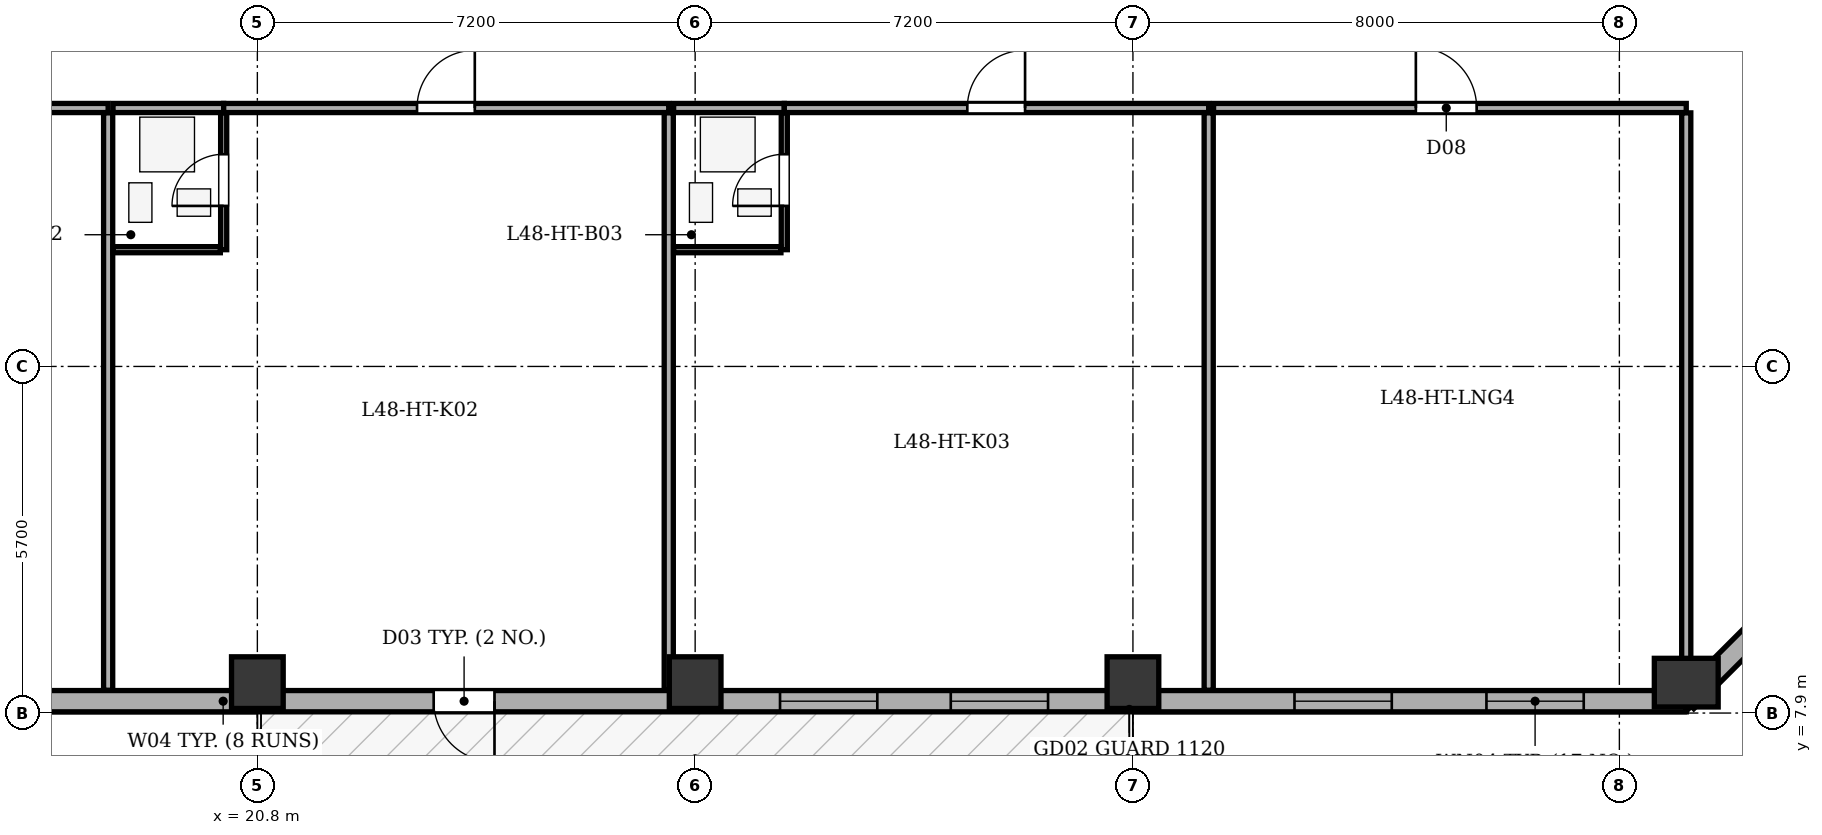
"""IFC4 building model, lengths in metres.
Left out: names, types, materials, properties, quantities, classifications, styles, units other than length and angle.
Written with IfcOpenShell. Run it as: python <this file> out.ifc"""

import sys

from ifc_helpers import new_model, si_unit, direction, frame, frame_2d, origin, origin_2d, place, context, subcontext, project, spatial, rectangle, extrude, element, fill, save


model = new_model("IFC4")
c1 = context("Model", 3, precision=1e-05, world=origin(), true_north=direction((0.0, 1.0)))
c2 = subcontext(c1, "Body", "Model", "MODEL_VIEW")
j1 = project(units=[si_unit("LENGTHUNIT", "METRE"), si_unit("PLANEANGLEUNIT", "RADIAN")], contexts=[c1])
p1 = place(None, origin())
s1 = spatial("IfcSite", under=j1, at=p1, CompositionType="ELEMENT")
p2 = place(p1, origin())
s2 = spatial("IfcBuilding", under=s1, at=p2, CompositionType="ELEMENT")
p3 = place(p2, frame((0.0, 0.0, 186.8)))
s3 = spatial("IfcBuildingStorey", under=s2, at=p3, CompositionType="ELEMENT", Elevation=186.8)
for number, where, z_axis, x_axis in (
    (1, (20.8, 8.4, 0.0), (0.0, 0.0, 1.0), (1.0, 0.0, 0.0)),
    (2, (28.0, 8.4, 0.0), (0.0, 0.0, 1.0), (1.0, 0.0, 0.0)),
    (3, (35.2, 8.4, 0.0), (0.0, 0.0, 1.0), (1.0, 0.0, 0.0)),
):
    element("IfcColumn", number, at=place(p3, frame(where, z_axis=z_axis, x_axis=x_axis)), inside=s3, PredefinedType="COLUMN", context=c2, shape_type="SweptSolid", body=[
        extrude(rectangle(XDim=0.85, YDim=0.85, at=origin_2d()), origin(), (0.0, 0.0, 1.0), 3.5),
    ])
p4 = place(p3, frame((44.3, 8.4, 0.0), z_axis=(0.0, 0.0, 1.0), x_axis=(1.0, 0.0, 0.0)))
e4 = element("IfcColumn", 4, at=p4, inside=s3, PredefinedType="COLUMN", context=c2, shape_type="SweptSolid", body=[
    extrude(rectangle(XDim=0.8, YDim=1.05, at=origin_2d()), origin(), (0.0, 0.0, 1.0), 3.5),
])
p5 = place(p3, frame((44.3, 8.095, 0.0), z_axis=(0.0, 0.0, 1.0), x_axis=(-1.0, 0.0, 0.0)))
e5 = element("IfcWall", 5, at=p5, inside=s3, PredefinedType="STANDARD", context=c2, shape_type="SweptSolid", body=[
    extrude(rectangle(XDim=35.0, YDim=0.35, at=frame_2d((17.5, 0.0))), origin(), (0.0, 0.0, 1.0), 2.785),
])
p6 = place(p5, frame((19.6, 0.0, 0.0)))
e6 = element("IfcOpeningElement", 6, at=p6, cuts=e5, PredefinedType="OPENING", context=c2, shape_type="SweptSolid", body=[
    extrude(rectangle(XDim=1.0, YDim=2.02, at=frame_2d((0.5, 1.01))), frame((0.0, 0.185, 0.0), z_axis=(0.0, -1.0, 0.0), x_axis=(1.0, 0.0, 0.0)), (0.0, 0.0, 1.0), 0.37),
])
p7 = place(p5, frame((1.686, 0.0, 0.75)))
e7 = element("IfcOpeningElement", 7, at=p7, cuts=e5, PredefinedType="OPENING", context=c2, shape_type="SweptSolid", body=[
    extrude(rectangle(XDim=1.6, YDim=1.75, at=frame_2d((0.8, 0.875))), frame((0.0, 0.185, 0.0), z_axis=(0.0, -1.0, 0.0), x_axis=(1.0, 0.0, 0.0)), (0.0, 0.0, 1.0), 0.37),
])
p8 = place(p5, frame((4.843, 0.0, 0.75)))
e8 = element("IfcOpeningElement", 8, at=p8, cuts=e5, PredefinedType="OPENING", context=c2, shape_type="SweptSolid", body=[
    extrude(rectangle(XDim=1.6, YDim=1.75, at=frame_2d((0.8, 0.875))), frame((0.0, 0.185, 0.0), z_axis=(0.0, -1.0, 0.0), x_axis=(1.0, 0.0, 0.0)), (0.0, 0.0, 1.0), 0.37),
])
p9 = place(p5, frame((10.496, 0.0, 0.75)))
e9 = element("IfcOpeningElement", 9, at=p9, cuts=e5, PredefinedType="OPENING", context=c2, shape_type="SweptSolid", body=[
    extrude(rectangle(XDim=1.6, YDim=1.75, at=frame_2d((0.8, 0.875))), frame((0.0, 0.185, 0.0), z_axis=(0.0, -1.0, 0.0), x_axis=(1.0, 0.0, 0.0)), (0.0, 0.0, 1.0), 0.37),
])
p10 = place(p5, frame((13.304, 0.0, 0.75)))
e10 = element("IfcOpeningElement", 10, at=p10, cuts=e5, PredefinedType="OPENING", context=c2, shape_type="SweptSolid", body=[
    extrude(rectangle(XDim=1.6, YDim=1.75, at=frame_2d((0.8, 0.875))), frame((0.0, 0.185, 0.0), z_axis=(0.0, -1.0, 0.0), x_axis=(1.0, 0.0, 0.0)), (0.0, 0.0, 1.0), 0.37),
])
p11 = place(p5, frame((27.525, 0.0, 0.75)))
e11 = element("IfcOpeningElement", 11, at=p11, cuts=e5, PredefinedType="OPENING", context=c2, shape_type="SweptSolid", body=[
    extrude(rectangle(XDim=1.6, YDim=1.75, at=frame_2d((0.8, 0.875))), frame((0.0, 0.185, 0.0), z_axis=(0.0, -1.0, 0.0), x_axis=(1.0, 0.0, 0.0)), (0.0, 0.0, 1.0), 0.37),
])
p12 = place(p5, frame((30.729, 0.0, 0.75)))
e12 = element("IfcOpeningElement", 12, at=p12, cuts=e5, PredefinedType="OPENING", context=c2, shape_type="SweptSolid", body=[
    extrude(rectangle(XDim=2.1, YDim=1.75, at=frame_2d((1.05, 0.875))), frame((0.0, 0.185, 0.0), z_axis=(0.0, -1.0, 0.0), x_axis=(1.0, 0.0, 0.0)), (0.0, 0.0, 1.0), 0.37),
])
p13 = place(p3, frame((49.105, 12.9, 0.0), z_axis=(0.0, 0.0, 1.0), x_axis=(-0.707106781187, -0.707106781187, 0.0)))
e13 = element("IfcWall", 13, at=p13, inside=s3, PredefinedType="STANDARD", context=c2, shape_type="SweptSolid", body=[
    extrude(rectangle(XDim=6.795, YDim=0.35, at=frame_2d((3.397, 0.0))), origin(), (0.0, 0.0, 1.0), 2.785),
])
p14 = place(p13, frame((2.698, 0.0, 0.75)))
e14 = element("IfcOpeningElement", 14, at=p14, cuts=e13, PredefinedType="OPENING", context=c2, shape_type="SweptSolid", body=[
    extrude(rectangle(XDim=1.4, YDim=1.65, at=frame_2d((0.7, 0.825))), frame((0.0, 0.185, 0.0), z_axis=(0.0, -1.0, 0.0), x_axis=(1.0, 0.0, 0.0)), (0.0, 0.0, 1.0), 0.37),
])
p15 = place(p3, frame((12.05, 17.85, 0.0), z_axis=(0.0, 0.0, 1.0), x_axis=(1.0, 0.0, 0.0)))
e15 = element("IfcWall", 15, at=p15, inside=s3, PredefinedType="PARTITIONING", context=c2, shape_type="SweptSolid", body=[
    extrude(rectangle(XDim=6.296, YDim=0.15, at=frame_2d((3.148, 0.0))), origin(), (0.0, 0.0, 1.0), 3.2),
])
p16 = place(p15, frame((2.668, 0.0, 0.0)))
e16 = element("IfcOpeningElement", 16, at=p16, cuts=e15, PredefinedType="OPENING", context=c2, shape_type="SweptSolid", body=[
    extrude(rectangle(XDim=0.95, YDim=2.1, at=frame_2d((0.475, 1.05))), frame((0.0, 0.085, 0.0), z_axis=(0.0, -1.0, 0.0), x_axis=(1.0, 0.0, 0.0)), (0.0, 0.0, 1.0), 0.17),
])
p17 = place(p3, frame((18.346, 8.275, 0.0), z_axis=(0.0, 0.0, 1.0), x_axis=(0.0, 1.0, 0.0)))
e17 = element("IfcWall", 17, at=p17, inside=s3, PredefinedType="PARTITIONING", context=c2, shape_type="SweptSolid", body=[
    extrude(rectangle(XDim=9.495, YDim=0.15, at=frame_2d((4.748, 0.0))), origin(), (0.0, 0.0, 1.0), 3.2),
])
p18 = place(p3, frame((18.426, 17.85, 0.0), z_axis=(0.0, 0.0, 1.0), x_axis=(1.0, 0.0, 0.0)))
e18 = element("IfcWall", 18, at=p18, inside=s3, PredefinedType="PARTITIONING", context=c2, shape_type="SweptSolid", body=[
    extrude(rectangle(XDim=1.82, YDim=0.15, at=frame_2d((0.91, 0.0))), origin(), (0.0, 0.0, 1.0), 3.2),
])
p19 = place(p3, frame((20.246, 17.85, 0.0), z_axis=(0.0, 0.0, 1.0), x_axis=(1.0, 0.0, 0.0)))
e19 = element("IfcWall", 19, at=p19, inside=s3, PredefinedType="PARTITIONING", context=c2, shape_type="SweptSolid", body=[
    extrude(rectangle(XDim=7.32, YDim=0.15, at=frame_2d((3.66, 0.0))), origin(), (0.0, 0.0, 1.0), 3.2),
])
p20 = place(p19, frame((3.18, 0.0, 0.0)))
e20 = element("IfcOpeningElement", 20, at=p20, cuts=e19, PredefinedType="OPENING", context=c2, shape_type="SweptSolid", body=[
    extrude(rectangle(XDim=0.95, YDim=2.1, at=frame_2d((0.475, 1.05))), frame((0.0, 0.085, 0.0), z_axis=(0.0, -1.0, 0.0), x_axis=(1.0, 0.0, 0.0)), (0.0, 0.0, 1.0), 0.17),
])
p21 = place(p3, frame((20.246, 15.52, 0.0), z_axis=(0.0, 0.0, 1.0), x_axis=(0.0, 1.0, 0.0)))
e21 = element("IfcWall", 21, at=p21, inside=s3, PredefinedType="PARTITIONING", context=c2, shape_type="SweptSolid", body=[
    extrude(rectangle(XDim=2.25, YDim=0.1, at=frame_2d((1.125, 0.0))), origin(), (0.0, 0.0, 1.0), 3.2),
])
p22 = place(p21, frame((0.72, 0.0, 0.0)))
e22 = element("IfcOpeningElement", 22, at=p22, cuts=e21, PredefinedType="OPENING", context=c2, shape_type="SweptSolid", body=[
    extrude(rectangle(XDim=0.85, YDim=2.05, at=frame_2d((0.425, 1.025))), frame((0.0, 0.06, 0.0), z_axis=(0.0, -1.0, 0.0), x_axis=(1.0, 0.0, 0.0)), (0.0, 0.0, 1.0), 0.12),
])
p23 = place(p3, frame((18.426, 15.52, 0.0), z_axis=(0.0, 0.0, 1.0), x_axis=(1.0, 0.0, 0.0)))
e23 = element("IfcWall", 23, at=p23, inside=s3, PredefinedType="PARTITIONING", context=c2, shape_type="SweptSolid", body=[
    extrude(rectangle(XDim=1.765, YDim=0.1, at=frame_2d((0.882, 0.0))), origin(), (0.0, 0.0, 1.0), 3.2),
])
p24 = place(p3, frame((27.566, 8.275, 0.0), z_axis=(0.0, 0.0, 1.0), x_axis=(0.0, 1.0, 0.0)))
e24 = element("IfcWall", 24, at=p24, inside=s3, PredefinedType="PARTITIONING", context=c2, shape_type="SweptSolid", body=[
    extrude(rectangle(XDim=9.495, YDim=0.15, at=frame_2d((4.748, 0.0))), origin(), (0.0, 0.0, 1.0), 3.2),
])
p25 = place(p3, frame((27.646, 17.85, 0.0), z_axis=(0.0, 0.0, 1.0), x_axis=(1.0, 0.0, 0.0)))
e25 = element("IfcWall", 25, at=p25, inside=s3, PredefinedType="PARTITIONING", context=c2, shape_type="SweptSolid", body=[
    extrude(rectangle(XDim=1.82, YDim=0.15, at=frame_2d((0.91, 0.0))), origin(), (0.0, 0.0, 1.0), 3.2),
])
p26 = place(p3, frame((29.466, 17.85, 0.0), z_axis=(0.0, 0.0, 1.0), x_axis=(1.0, 0.0, 0.0)))
e26 = element("IfcWall", 26, at=p26, inside=s3, PredefinedType="PARTITIONING", context=c2, shape_type="SweptSolid", body=[
    extrude(rectangle(XDim=6.98, YDim=0.15, at=frame_2d((3.49, 0.0))), origin(), (0.0, 0.0, 1.0), 3.2),
])
p27 = place(p26, frame((3.01, 0.0, 0.0)))
e27 = element("IfcOpeningElement", 27, at=p27, cuts=e26, PredefinedType="OPENING", context=c2, shape_type="SweptSolid", body=[
    extrude(rectangle(XDim=0.95, YDim=2.1, at=frame_2d((0.475, 1.05))), frame((0.0, 0.085, 0.0), z_axis=(0.0, -1.0, 0.0), x_axis=(1.0, 0.0, 0.0)), (0.0, 0.0, 1.0), 0.17),
])
p28 = place(p3, frame((29.466, 15.52, 0.0), z_axis=(0.0, 0.0, 1.0), x_axis=(0.0, 1.0, 0.0)))
e28 = element("IfcWall", 28, at=p28, inside=s3, PredefinedType="PARTITIONING", context=c2, shape_type="SweptSolid", body=[
    extrude(rectangle(XDim=2.25, YDim=0.1, at=frame_2d((1.125, 0.0))), origin(), (0.0, 0.0, 1.0), 3.2),
])
p29 = place(p28, frame((0.72, 0.0, 0.0)))
e29 = element("IfcOpeningElement", 29, at=p29, cuts=e28, PredefinedType="OPENING", context=c2, shape_type="SweptSolid", body=[
    extrude(rectangle(XDim=0.85, YDim=2.05, at=frame_2d((0.425, 1.025))), frame((0.0, 0.06, 0.0), z_axis=(0.0, -1.0, 0.0), x_axis=(1.0, 0.0, 0.0)), (0.0, 0.0, 1.0), 0.12),
])
p30 = place(p3, frame((27.646, 15.52, 0.0), z_axis=(0.0, 0.0, 1.0), x_axis=(1.0, 0.0, 0.0)))
e30 = element("IfcWall", 30, at=p30, inside=s3, PredefinedType="PARTITIONING", context=c2, shape_type="SweptSolid", body=[
    extrude(rectangle(XDim=1.765, YDim=0.1, at=frame_2d((0.882, 0.0))), origin(), (0.0, 0.0, 1.0), 3.2),
])
p31 = place(p3, frame((36.446, 8.275, 0.0), z_axis=(0.0, 0.0, 1.0), x_axis=(0.0, 1.0, 0.0)))
e31 = element("IfcWall", 31, at=p31, inside=s3, PredefinedType="PARTITIONING", context=c2, shape_type="SweptSolid", body=[
    extrude(rectangle(XDim=9.495, YDim=0.15, at=frame_2d((4.748, 0.0))), origin(), (0.0, 0.0, 1.0), 3.2),
])
p32 = place(p3, frame((36.526, 17.85, 0.0), z_axis=(0.0, 0.0, 1.0), x_axis=(1.0, 0.0, 0.0)))
e32 = element("IfcWall", 32, at=p32, inside=s3, PredefinedType="PARTITIONING", context=c2, shape_type="SweptSolid", body=[
    extrude(rectangle(XDim=7.774, YDim=0.15, at=frame_2d((3.887, 0.0))), origin(), (0.0, 0.0, 1.0), 3.2),
])
p33 = place(p32, frame((3.327, 0.0, 0.0)))
e33 = element("IfcOpeningElement", 33, at=p33, cuts=e32, PredefinedType="OPENING", context=c2, shape_type="SweptSolid", body=[
    extrude(rectangle(XDim=1.0, YDim=2.1, at=frame_2d((0.5, 1.05))), frame((0.0, 0.085, 0.0), z_axis=(0.0, -1.0, 0.0), x_axis=(1.0, 0.0, 0.0)), (0.0, 0.0, 1.0), 0.17),
])
p34 = place(p3, frame((44.3, 8.275, 0.0), z_axis=(0.0, 0.0, 1.0), x_axis=(0.0, 1.0, 0.0)))
e34 = element("IfcWall", 34, at=p34, inside=s3, PredefinedType="PARTITIONING", context=c2, shape_type="SweptSolid", body=[
    extrude(rectangle(XDim=9.495, YDim=0.15, at=frame_2d((4.748, 0.0))), origin(), (0.0, 0.0, 1.0), 3.2),
])
p35 = place(p6, origin())
e35 = element("IfcDoor", 35, at=p35, inside=s3, OperationType="SINGLE_SWING_LEFT", PredefinedType="DOOR", context=c2, shape_type="SweptSolid", body=[
    extrude(rectangle(XDim=1.0, YDim=2.02, at=frame_2d((0.5, 1.01))), frame((0.0, 0.025, 0.0), z_axis=(0.0, -1.0, 0.0), x_axis=(1.0, 0.0, 0.0)), (0.0, 0.0, 1.0), 0.05),
])
fill(e6, e35)
p36 = place(p7, origin())
e36 = element("IfcWindow", 36, at=p36, inside=s3, PartitioningType="SINGLE_PANEL", PredefinedType="WINDOW", context=c2, shape_type="SweptSolid", body=[
    extrude(rectangle(XDim=1.6, YDim=1.75, at=frame_2d((0.8, 0.875))), frame((0.0, -0.01, 0.0), z_axis=(0.0, -1.0, 0.0), x_axis=(1.0, 0.0, 0.0)), (0.0, 0.0, 1.0), 0.06),
])
fill(e7, e36)
p37 = place(p8, origin())
e37 = element("IfcWindow", 37, at=p37, inside=s3, PartitioningType="SINGLE_PANEL", PredefinedType="WINDOW", context=c2, shape_type="SweptSolid", body=[
    extrude(rectangle(XDim=1.6, YDim=1.75, at=frame_2d((0.8, 0.875))), frame((0.0, -0.01, 0.0), z_axis=(0.0, -1.0, 0.0), x_axis=(1.0, 0.0, 0.0)), (0.0, 0.0, 1.0), 0.06),
])
fill(e8, e37)
p38 = place(p9, origin())
e38 = element("IfcWindow", 38, at=p38, inside=s3, PartitioningType="SINGLE_PANEL", PredefinedType="WINDOW", context=c2, shape_type="SweptSolid", body=[
    extrude(rectangle(XDim=1.6, YDim=1.75, at=frame_2d((0.8, 0.875))), frame((0.0, -0.01, 0.0), z_axis=(0.0, -1.0, 0.0), x_axis=(1.0, 0.0, 0.0)), (0.0, 0.0, 1.0), 0.06),
])
fill(e9, e38)
p39 = place(p10, origin())
e39 = element("IfcWindow", 39, at=p39, inside=s3, PartitioningType="SINGLE_PANEL", PredefinedType="WINDOW", context=c2, shape_type="SweptSolid", body=[
    extrude(rectangle(XDim=1.6, YDim=1.75, at=frame_2d((0.8, 0.875))), frame((0.0, -0.01, 0.0), z_axis=(0.0, -1.0, 0.0), x_axis=(1.0, 0.0, 0.0)), (0.0, 0.0, 1.0), 0.06),
])
fill(e10, e39)
p40 = place(p22, origin())
e40 = element("IfcDoor", 40, at=p40, inside=s3, OperationType="SINGLE_SWING_LEFT", PredefinedType="DOOR", context=c2, shape_type="SweptSolid", body=[
    extrude(rectangle(XDim=0.85, YDim=2.05, at=frame_2d((0.425, 1.025))), frame((0.0, 0.025, 0.0), z_axis=(0.0, -1.0, 0.0), x_axis=(1.0, 0.0, 0.0)), (0.0, 0.0, 1.0), 0.05),
])
fill(e22, e40)
p41 = place(p20, origin())
e41 = element("IfcDoor", 41, at=p41, inside=s3, OperationType="SINGLE_SWING_RIGHT", PredefinedType="DOOR", context=c2, shape_type="SweptSolid", body=[
    extrude(rectangle(XDim=0.95, YDim=2.1, at=frame_2d((0.475, 1.05))), frame((0.0, 0.025, 0.0), z_axis=(0.0, -1.0, 0.0), x_axis=(1.0, 0.0, 0.0)), (0.0, 0.0, 1.0), 0.05),
])
fill(e20, e41)
p42 = place(p29, origin())
e42 = element("IfcDoor", 42, at=p42, inside=s3, OperationType="SINGLE_SWING_LEFT", PredefinedType="DOOR", context=c2, shape_type="SweptSolid", body=[
    extrude(rectangle(XDim=0.85, YDim=2.05, at=frame_2d((0.425, 1.025))), frame((0.0, 0.025, 0.0), z_axis=(0.0, -1.0, 0.0), x_axis=(1.0, 0.0, 0.0)), (0.0, 0.0, 1.0), 0.05),
])
fill(e29, e42)
p43 = place(p27, origin())
e43 = element("IfcDoor", 43, at=p43, inside=s3, OperationType="SINGLE_SWING_RIGHT", PredefinedType="DOOR", context=c2, shape_type="SweptSolid", body=[
    extrude(rectangle(XDim=0.95, YDim=2.1, at=frame_2d((0.475, 1.05))), frame((0.0, 0.025, 0.0), z_axis=(0.0, -1.0, 0.0), x_axis=(1.0, 0.0, 0.0)), (0.0, 0.0, 1.0), 0.05),
])
fill(e27, e43)
p44 = place(p33, origin())
e44 = element("IfcDoor", 44, at=p44, inside=s3, OperationType="SINGLE_SWING_LEFT", PredefinedType="DOOR", context=c2, shape_type="SweptSolid", body=[
    extrude(rectangle(XDim=1.0, YDim=2.1, at=frame_2d((0.5, 1.05))), frame((0.0, 0.025, 0.0), z_axis=(0.0, -1.0, 0.0), x_axis=(1.0, 0.0, 0.0)), (0.0, 0.0, 1.0), 0.05),
])
fill(e33, e44)
save(model, sys.argv[1])
